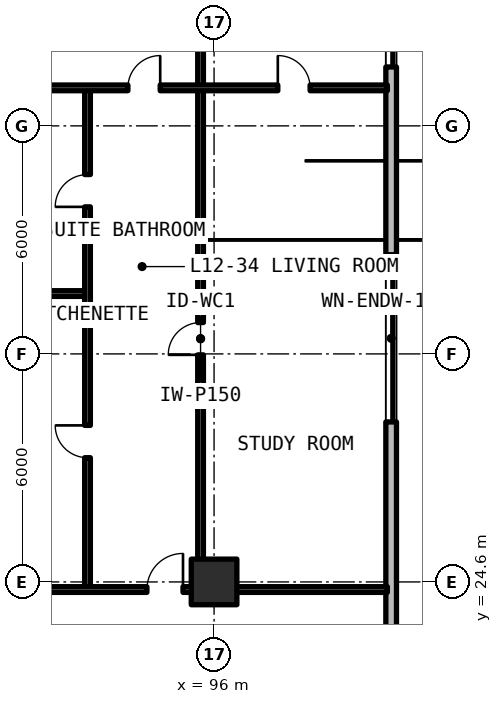
"""IFC4 building model, lengths in metres.
Left out: names, types, materials, properties, quantities, classifications, styles, units other than length and angle.
Written with IfcOpenShell. Run it as: python <this file> out.ifc"""

import sys

from ifc_helpers import new_model, si_unit, direction, frame, frame_2d, origin, origin_2d, place, context, subcontext, project, spatial, rectangle, extrude, element, fill, save


model = new_model("IFC4")
c1 = context("Model", 3, precision=1e-05, world=origin(), true_north=direction((0.0, 1.0)))
c2 = subcontext(c1, "Body", "Model", "MODEL_VIEW")
j1 = project(units=[si_unit("LENGTHUNIT", "METRE"), si_unit("PLANEANGLEUNIT", "RADIAN")], contexts=[c1])
p1 = place(None, origin())
s1 = spatial("IfcSite", under=j1, at=p1, CompositionType="ELEMENT")
p2 = place(p1, origin())
s2 = spatial("IfcBuilding", under=s1, at=p2, CompositionType="ELEMENT")
p3 = place(p2, frame((0.0, 0.0, 45.54)))
s3 = spatial("IfcBuildingStorey", under=s2, at=p3, CompositionType="ELEMENT", Elevation=45.54)
p4 = place(p3, frame((96.0, 24.6, 0.0), z_axis=(0.0, 0.0, 1.0), x_axis=(1.0, 0.0, 0.0)))
e1 = element("IfcColumn", 1, at=p4, inside=s3, PredefinedType="COLUMN", context=c2, shape_type="SweptSolid", body=[
    extrude(rectangle(XDim=1.2, YDim=1.2, at=origin_2d()), origin(), (0.0, 0.0, 1.0), 3.3),
])
p5 = place(p3, frame((100.66, 11.858, 0.0), z_axis=(0.0, 0.0, 1.0), x_axis=(0.0, 1.0, 0.0)))
e2 = element("IfcWall", 2, at=p5, inside=s3, PredefinedType="SOLIDWALL", context=c2, shape_type="SweptSolid", body=[
    extrude(rectangle(XDim=43.484, YDim=0.28, at=frame_2d((21.742, 0.0))), origin(), (0.0, 0.0, 1.0), 3.08),
])
p6 = place(p5, frame((3.442, 0.0, 0.0)))
e3 = element("IfcOpeningElement", 3, at=p6, cuts=e2, PredefinedType="OPENING", context=c2, shape_type="SweptSolid", body=[
    extrude(rectangle(XDim=1.1, YDim=2.15, at=frame_2d((0.55, 1.075))), frame((0.0, 0.15, 0.0), z_axis=(0.0, -1.0, 0.0), x_axis=(1.0, 0.0, 0.0)), (0.0, 0.0, 1.0), 0.3),
])
p7 = place(p5, frame((38.942, 0.0, 0.0)))
e4 = element("IfcOpeningElement", 4, at=p7, cuts=e2, PredefinedType="OPENING", context=c2, shape_type="SweptSolid", body=[
    extrude(rectangle(XDim=1.1, YDim=2.15, at=frame_2d((0.55, 1.075))), frame((0.0, 0.15, 0.0), z_axis=(0.0, -1.0, 0.0), x_axis=(1.0, 0.0, 0.0)), (0.0, 0.0, 1.0), 0.3),
])
p8 = place(p5, frame((16.952, 0.0, 0.78)))
e5 = element("IfcOpeningElement", 5, at=p8, cuts=e2, PredefinedType="OPENING", context=c2, shape_type="SweptSolid", body=[
    extrude(rectangle(XDim=4.4, YDim=1.66, at=frame_2d((2.2, 0.83))), frame((0.0, 0.15, 0.0), z_axis=(0.0, -1.0, 0.0), x_axis=(1.0, 0.0, 0.0)), (0.0, 0.0, 1.0), 0.3),
])
p9 = place(p5, frame((26.292, 0.0, 0.78)))
e6 = element("IfcOpeningElement", 6, at=p9, cuts=e2, PredefinedType="OPENING", context=c2, shape_type="SweptSolid", body=[
    extrude(rectangle(XDim=4.4, YDim=1.66, at=frame_2d((2.2, 0.83))), frame((0.0, 0.15, 0.0), z_axis=(0.0, -1.0, 0.0), x_axis=(1.0, 0.0, 0.0)), (0.0, 0.0, 1.0), 0.3),
])
p10 = place(p3, frame((95.645, 24.4, 0.0), z_axis=(0.0, 0.0, 1.0), x_axis=(0.0, 1.0, 0.0)))
e7 = element("IfcWall", 7, at=p10, inside=s3, PredefinedType="PARTITIONING", context=c2, shape_type="SweptSolid", body=[
    extrude(rectangle(XDim=13.2, YDim=0.15, at=frame_2d((6.6, 0.0))), origin(), (0.0, 0.0, 1.0), 2.35),
])
p11 = place(p10, frame((6.175, 0.0, 0.0)))
e8 = element("IfcOpeningElement", 8, at=p11, cuts=e7, PredefinedType="OPENING", context=c2, shape_type="SweptSolid", body=[
    extrude(rectangle(XDim=0.85, YDim=2.1, at=frame_2d((0.425, 1.05))), frame((0.0, 0.085, 0.0), z_axis=(0.0, -1.0, 0.0), x_axis=(1.0, 0.0, 0.0)), (0.0, 0.0, 1.0), 0.17),
])
p12 = place(p3, frame((90.32, 32.188, 0.0), z_axis=(0.0, 0.0, 1.0), x_axis=(1.0, 0.0, 0.0)))
e9 = element("IfcWall", 9, at=p12, inside=s3, PredefinedType="PARTITIONING", context=c2, shape_type="SweptSolid", body=[
    extrude(rectangle(XDim=2.35, YDim=0.15, at=frame_2d((1.175, 0.0))), origin(), (0.0, 0.0, 1.0), 2.35),
])
p13 = place(p3, frame((92.67, 24.4, 0.0), z_axis=(0.0, 0.0, 1.0), x_axis=(0.0, 1.0, 0.0)))
e10 = element("IfcWall", 10, at=p13, inside=s3, PredefinedType="PARTITIONING", context=c2, shape_type="SweptSolid", body=[
    extrude(rectangle(XDim=13.2, YDim=0.15, at=frame_2d((6.6, 0.0))), origin(), (0.0, 0.0, 1.0), 2.35),
])
p14 = place(p13, frame((3.469, 0.0, 0.0)))
e11 = element("IfcOpeningElement", 11, at=p14, cuts=e10, PredefinedType="OPENING", context=c2, shape_type="SweptSolid", body=[
    extrude(rectangle(XDim=0.85, YDim=2.1, at=frame_2d((0.425, 1.05))), frame((0.0, 0.085, 0.0), z_axis=(0.0, -1.0, 0.0), x_axis=(1.0, 0.0, 0.0)), (0.0, 0.0, 1.0), 0.17),
])
p15 = place(p13, frame((10.069, 0.0, 0.0)))
e12 = element("IfcOpeningElement", 12, at=p15, cuts=e10, PredefinedType="OPENING", context=c2, shape_type="SweptSolid", body=[
    extrude(rectangle(XDim=0.85, YDim=2.1, at=frame_2d((0.425, 1.05))), frame((0.0, 0.085, 0.0), z_axis=(0.0, -1.0, 0.0), x_axis=(1.0, 0.0, 0.0)), (0.0, 0.0, 1.0), 0.17),
])
p16 = place(p3, frame((95.645, 37.6, 0.0), z_axis=(0.0, 0.0, 1.0), x_axis=(0.0, 1.0, 0.0)))
e13 = element("IfcWall", 13, at=p16, inside=s3, PredefinedType="PARTITIONING", context=c2, shape_type="SweptSolid", body=[
    extrude(rectangle(XDim=5.2, YDim=0.15, at=frame_2d((2.6, 0.0))), origin(), (0.0, 0.0, 1.0), 2.35),
])
p17 = place(p3, frame((90.32, 37.6, 0.0), z_axis=(0.0, 0.0, 1.0), x_axis=(1.0, 0.0, 0.0)))
e14 = element("IfcWall", 14, at=p17, inside=s3, PredefinedType="PARTITIONING", context=c2, shape_type="SweptSolid", body=[
    extrude(rectangle(XDim=10.24, YDim=0.15, at=frame_2d((5.12, 0.0))), origin(), (0.0, 0.0, 1.0), 2.35),
])
p18 = place(p17, frame((3.412, 0.0, 0.0)))
e15 = element("IfcOpeningElement", 15, at=p18, cuts=e14, PredefinedType="OPENING", context=c2, shape_type="SweptSolid", body=[
    extrude(rectangle(XDim=0.85, YDim=2.1, at=frame_2d((0.425, 1.05))), frame((0.0, 0.085, 0.0), z_axis=(0.0, -1.0, 0.0), x_axis=(1.0, 0.0, 0.0)), (0.0, 0.0, 1.0), 0.17),
])
p19 = place(p17, frame((7.357, 0.0, 0.0)))
e16 = element("IfcOpeningElement", 16, at=p19, cuts=e14, PredefinedType="OPENING", context=c2, shape_type="SweptSolid", body=[
    extrude(rectangle(XDim=0.85, YDim=2.1, at=frame_2d((0.425, 1.05))), frame((0.0, 0.085, 0.0), z_axis=(0.0, -1.0, 0.0), x_axis=(1.0, 0.0, 0.0)), (0.0, 0.0, 1.0), 0.17),
])
p20 = place(p3, frame((90.32, 24.4, 0.0), z_axis=(0.0, 0.0, 1.0), x_axis=(1.0, 0.0, 0.0)))
e17 = element("IfcWall", 17, at=p20, inside=s3, PredefinedType="SOLIDWALL", context=c2, shape_type="SweptSolid", body=[
    extrude(rectangle(XDim=10.24, YDim=0.15, at=frame_2d((5.12, 0.0))), origin(), (0.0, 0.0, 1.0), 2.295),
])
p21 = place(p20, frame((3.913, 0.0, 0.0)))
e18 = element("IfcOpeningElement", 18, at=p21, cuts=e17, PredefinedType="OPENING", context=c2, shape_type="SweptSolid", body=[
    extrude(rectangle(XDim=0.95, YDim=2.15, at=frame_2d((0.475, 1.075))), frame((0.0, 0.085, 0.0), z_axis=(0.0, -1.0, 0.0), x_axis=(1.0, 0.0, 0.0)), (0.0, 0.0, 1.0), 0.17),
])
p22 = place(p8, origin())
e19 = element("IfcWindow", 19, at=p22, inside=s3, PartitioningType="SINGLE_PANEL", PredefinedType="WINDOW", context=c2, shape_type="SweptSolid", body=[
    extrude(rectangle(XDim=4.4, YDim=1.66, at=frame_2d((2.2, 0.83))), frame((0.0, 0.03, 0.0), z_axis=(0.0, -1.0, 0.0), x_axis=(1.0, 0.0, 0.0)), (0.0, 0.0, 1.0), 0.06),
])
fill(e5, e19)
p23 = place(p9, origin())
e20 = element("IfcWindow", 20, at=p23, inside=s3, PartitioningType="SINGLE_PANEL", PredefinedType="WINDOW", context=c2, shape_type="SweptSolid", body=[
    extrude(rectangle(XDim=4.4, YDim=1.66, at=frame_2d((2.2, 0.83))), frame((0.0, 0.03, 0.0), z_axis=(0.0, -1.0, 0.0), x_axis=(1.0, 0.0, 0.0)), (0.0, 0.0, 1.0), 0.06),
])
fill(e6, e20)
p24 = place(p11, origin())
e21 = element("IfcDoor", 21, at=p24, inside=s3, OperationType="SINGLE_SWING_LEFT", PredefinedType="DOOR", context=c2, shape_type="SweptSolid", body=[
    extrude(rectangle(XDim=0.85, YDim=2.1, at=frame_2d((0.425, 1.05))), frame((0.0, 0.025, 0.0), z_axis=(0.0, -1.0, 0.0), x_axis=(1.0, 0.0, 0.0)), (0.0, 0.0, 1.0), 0.05),
])
fill(e8, e21)
p25 = place(p14, origin())
e22 = element("IfcDoor", 22, at=p25, inside=s3, OperationType="SINGLE_SWING_RIGHT", PredefinedType="DOOR", context=c2, shape_type="SweptSolid", body=[
    extrude(rectangle(XDim=0.85, YDim=2.1, at=frame_2d((0.425, 1.05))), frame((0.0, 0.025, 0.0), z_axis=(0.0, -1.0, 0.0), x_axis=(1.0, 0.0, 0.0)), (0.0, 0.0, 1.0), 0.05),
])
fill(e11, e22)
p26 = place(p15, origin())
e23 = element("IfcDoor", 23, at=p26, inside=s3, OperationType="SINGLE_SWING_LEFT", PredefinedType="DOOR", context=c2, shape_type="SweptSolid", body=[
    extrude(rectangle(XDim=0.85, YDim=2.1, at=frame_2d((0.425, 1.05))), frame((0.0, 0.025, 0.0), z_axis=(0.0, -1.0, 0.0), x_axis=(1.0, 0.0, 0.0)), (0.0, 0.0, 1.0), 0.05),
])
fill(e12, e23)
p27 = place(p18, origin())
e24 = element("IfcDoor", 24, at=p27, inside=s3, OperationType="SINGLE_SWING_RIGHT", PredefinedType="DOOR", context=c2, shape_type="SweptSolid", body=[
    extrude(rectangle(XDim=0.85, YDim=2.1, at=frame_2d((0.425, 1.05))), frame((0.0, 0.025, 0.0), z_axis=(0.0, -1.0, 0.0), x_axis=(1.0, 0.0, 0.0)), (0.0, 0.0, 1.0), 0.05),
])
fill(e15, e24)
p28 = place(p19, origin())
e25 = element("IfcDoor", 25, at=p28, inside=s3, OperationType="SINGLE_SWING_LEFT", PredefinedType="DOOR", context=c2, shape_type="SweptSolid", body=[
    extrude(rectangle(XDim=0.85, YDim=2.1, at=frame_2d((0.425, 1.05))), frame((0.0, 0.025, 0.0), z_axis=(0.0, -1.0, 0.0), x_axis=(1.0, 0.0, 0.0)), (0.0, 0.0, 1.0), 0.05),
])
fill(e16, e25)
p29 = place(p21, origin())
e26 = element("IfcDoor", 26, at=p29, inside=s3, OperationType="SINGLE_SWING_RIGHT", PredefinedType="DOOR", context=c2, shape_type="SweptSolid", body=[
    extrude(rectangle(XDim=0.95, YDim=2.15, at=frame_2d((0.475, 1.075))), frame((0.0, 0.025, 0.0), z_axis=(0.0, -1.0, 0.0), x_axis=(1.0, 0.0, 0.0)), (0.0, 0.0, 1.0), 0.05),
])
fill(e18, e26)
save(model, sys.argv[1])
